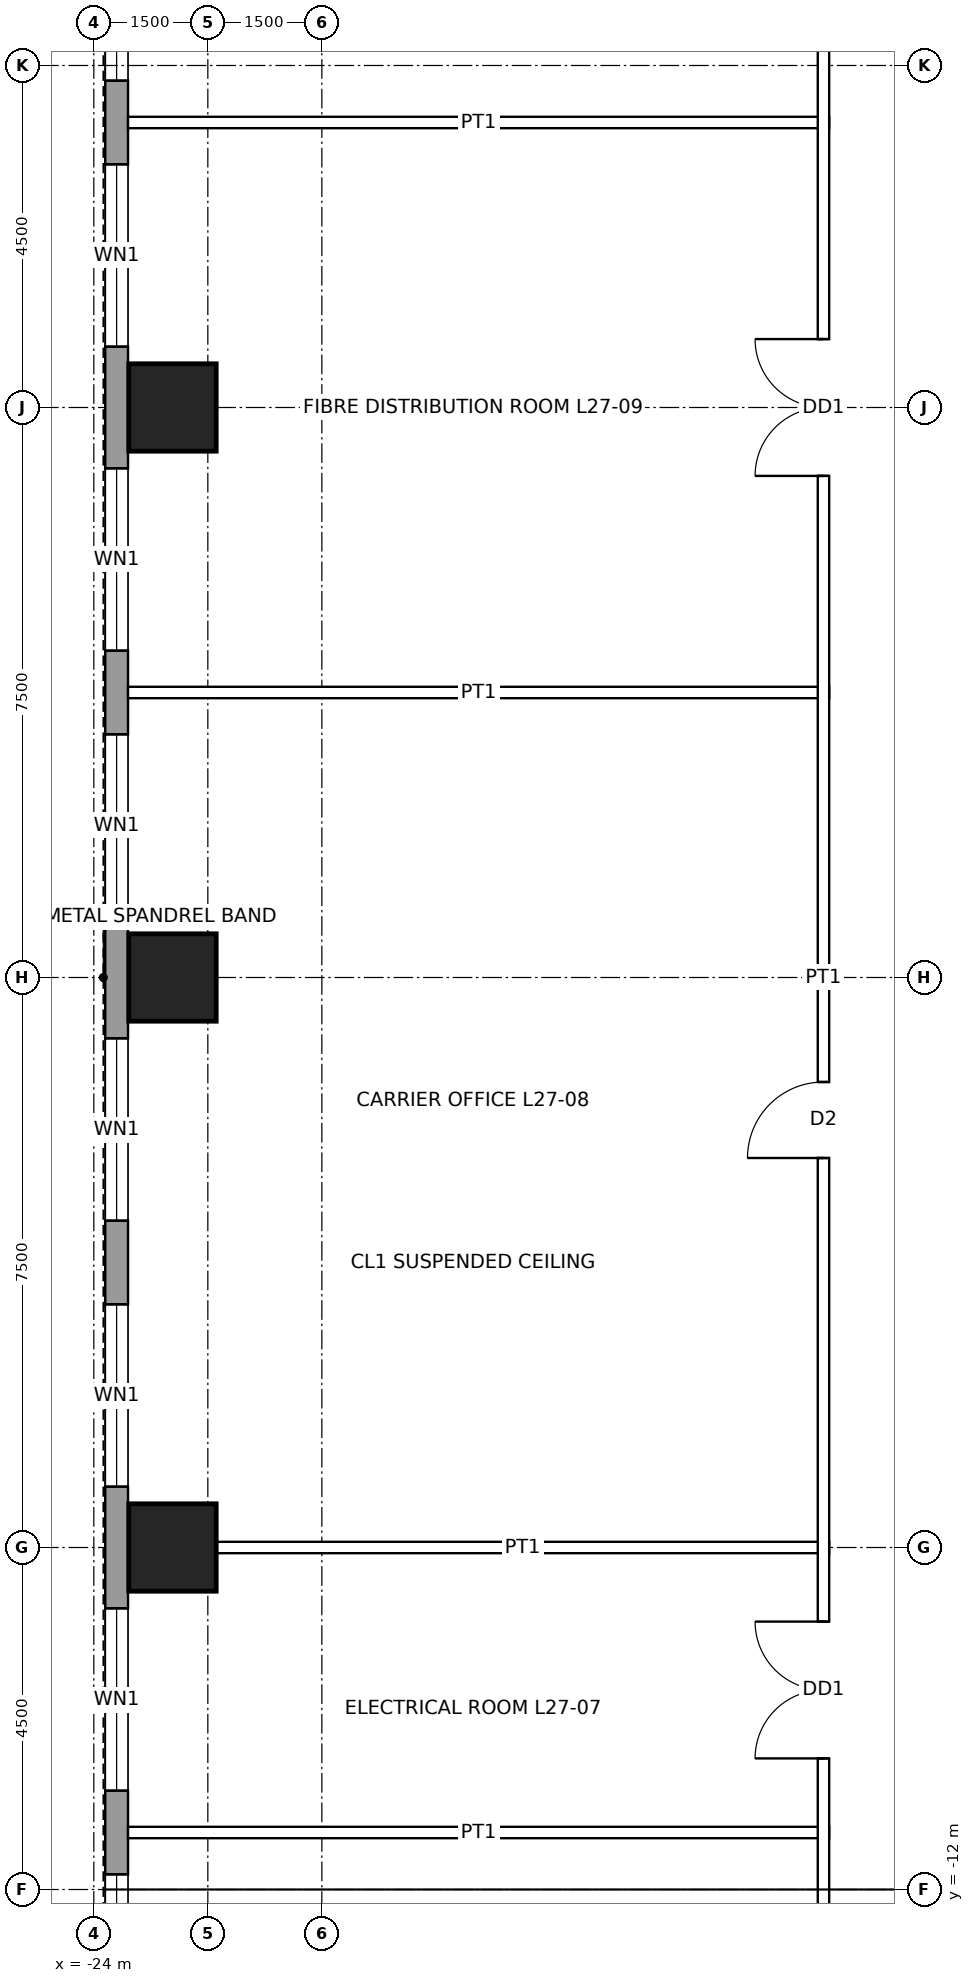
"""IFC4 building model, lengths in metres.
Left out: names, types, materials, properties, quantities, classifications, styles, units other than length and angle.
Written with IfcOpenShell. Run it as: python <this file> out.ifc"""

import sys

from ifc_helpers import new_model, si_unit, direction, frame, frame_2d, origin, origin_2d, place, context, subcontext, project, spatial, rectangle, hollow_rectangle, extrude, element, fill, save


model = new_model("IFC4")
c1 = context("Model", 3, precision=1e-05, world=origin(), true_north=direction((0.0, 1.0)))
c2 = subcontext(c1, "Body", "Model", "MODEL_VIEW")
j1 = project(units=[si_unit("LENGTHUNIT", "METRE"), si_unit("PLANEANGLEUNIT", "RADIAN")], contexts=[c1])
p1 = place(None, origin())
s1 = spatial("IfcSite", under=j1, at=p1, CompositionType="ELEMENT")
p2 = place(p1, origin())
s2 = spatial("IfcBuilding", under=s1, at=p2, CompositionType="ELEMENT")
p3 = place(p2, frame((0.0, 0.0, 135.9)))
s3 = spatial("IfcBuildingStorey", under=s2, at=p3, CompositionType="ELEMENT", Elevation=135.9)
for number, where, z_axis, x_axis in (
    (1, (-22.965, -7.5, 0.0), (0.0, 0.0, 1.0), (1.0, 0.0, 0.0)),
    (2, (-22.965, 0.0, 0.0), (0.0, 0.0, 1.0), (1.0, 0.0, 0.0)),
    (3, (-22.965, 7.5, 0.0), (0.0, 0.0, 1.0), (1.0, 0.0, 0.0)),
):
    element("IfcColumn", number, at=place(p3, frame(where, z_axis=z_axis, x_axis=x_axis)), inside=s3, PredefinedType="COLUMN", context=c2, shape_type="SweptSolid", body=[
        extrude(hollow_rectangle(XDim=1.15, YDim=1.15, WallThickness=0.075, at=origin_2d()), origin(), (0.0, 0.0, 1.0), 4.5),
    ])
p4 = place(p3, frame((-23.7, -16.2, 0.0), z_axis=(0.0, 0.0, 1.0), x_axis=(0.0, 1.0, 0.0)))
e4 = element("IfcWall", 4, at=p4, inside=s3, PredefinedType="SOLIDWALL", context=c2, shape_type="SweptSolid", body=[
    extrude(rectangle(XDim=32.4, YDim=0.3, at=frame_2d((16.2, 0.0))), origin(), (0.0, 0.0, 1.0), 4.3),
])
p5 = place(p4, frame((2.0, 0.0, 1.0)))
e5 = element("IfcOpeningElement", 5, at=p5, cuts=e4, PredefinedType="OPENING", context=c2, shape_type="SweptSolid", body=[
    extrude(rectangle(XDim=2.4, YDim=1.2, at=frame_2d((1.2, 0.6))), frame((0.0, 0.16, 0.0), z_axis=(0.0, -1.0, 0.0), x_axis=(1.0, 0.0, 0.0)), (0.0, 0.0, 1.0), 0.32),
])
p6 = place(p4, frame((5.5, 0.0, 1.0)))
e6 = element("IfcOpeningElement", 6, at=p6, cuts=e4, PredefinedType="OPENING", context=c2, shape_type="SweptSolid", body=[
    extrude(rectangle(XDim=2.4, YDim=1.2, at=frame_2d((1.2, 0.6))), frame((0.0, 0.16, 0.0), z_axis=(0.0, -1.0, 0.0), x_axis=(1.0, 0.0, 0.0)), (0.0, 0.0, 1.0), 0.32),
])
p7 = place(p4, frame((9.5, 0.0, 1.0)))
e7 = element("IfcOpeningElement", 7, at=p7, cuts=e4, PredefinedType="OPENING", context=c2, shape_type="SweptSolid", body=[
    extrude(rectangle(XDim=2.4, YDim=1.2, at=frame_2d((1.2, 0.6))), frame((0.0, 0.16, 0.0), z_axis=(0.0, -1.0, 0.0), x_axis=(1.0, 0.0, 0.0)), (0.0, 0.0, 1.0), 0.32),
])
p8 = place(p4, frame((13.0, 0.0, 1.0)))
e8 = element("IfcOpeningElement", 8, at=p8, cuts=e4, PredefinedType="OPENING", context=c2, shape_type="SweptSolid", body=[
    extrude(rectangle(XDim=2.4, YDim=1.2, at=frame_2d((1.2, 0.6))), frame((0.0, 0.16, 0.0), z_axis=(0.0, -1.0, 0.0), x_axis=(1.0, 0.0, 0.0)), (0.0, 0.0, 1.0), 0.32),
])
p9 = place(p4, frame((17.0, 0.0, 1.0)))
e9 = element("IfcOpeningElement", 9, at=p9, cuts=e4, PredefinedType="OPENING", context=c2, shape_type="SweptSolid", body=[
    extrude(rectangle(XDim=2.4, YDim=1.2, at=frame_2d((1.2, 0.6))), frame((0.0, 0.16, 0.0), z_axis=(0.0, -1.0, 0.0), x_axis=(1.0, 0.0, 0.0)), (0.0, 0.0, 1.0), 0.32),
])
p10 = place(p4, frame((20.5, 0.0, 1.0)))
e10 = element("IfcOpeningElement", 10, at=p10, cuts=e4, PredefinedType="OPENING", context=c2, shape_type="SweptSolid", body=[
    extrude(rectangle(XDim=2.4, YDim=1.2, at=frame_2d((1.2, 0.6))), frame((0.0, 0.16, 0.0), z_axis=(0.0, -1.0, 0.0), x_axis=(1.0, 0.0, 0.0)), (0.0, 0.0, 1.0), 0.32),
])
p11 = place(p4, frame((24.5, 0.0, 1.0)))
e11 = element("IfcOpeningElement", 11, at=p11, cuts=e4, PredefinedType="OPENING", context=c2, shape_type="SweptSolid", body=[
    extrude(rectangle(XDim=2.4, YDim=1.2, at=frame_2d((1.2, 0.6))), frame((0.0, 0.16, 0.0), z_axis=(0.0, -1.0, 0.0), x_axis=(1.0, 0.0, 0.0)), (0.0, 0.0, 1.0), 0.32),
])
p12 = place(p4, frame((28.0, 0.0, 1.0)))
e12 = element("IfcOpeningElement", 12, at=p12, cuts=e4, PredefinedType="OPENING", context=c2, shape_type="SweptSolid", body=[
    extrude(rectangle(XDim=2.4, YDim=1.2, at=frame_2d((1.2, 0.6))), frame((0.0, 0.16, 0.0), z_axis=(0.0, -1.0, 0.0), x_axis=(1.0, 0.0, 0.0)), (0.0, 0.0, 1.0), 0.32),
])
p13 = place(p3, frame((-23.55, -11.25, 0.0), z_axis=(0.0, 0.0, 1.0), x_axis=(1.0, 0.0, 0.0)))
e13 = element("IfcWall", 13, at=p13, inside=s3, PredefinedType="PARTITIONING", context=c2, shape_type="SweptSolid", body=[
    extrude(rectangle(XDim=9.225, YDim=0.15, at=frame_2d((4.613, 0.0))), origin(), (0.0, 0.0, 1.0), 3.431),
])
p14 = place(p3, frame((-22.39, -7.5, 0.0), z_axis=(0.0, 0.0, 1.0), x_axis=(1.0, 0.0, 0.0)))
e14 = element("IfcWall", 14, at=p14, inside=s3, PredefinedType="PARTITIONING", context=c2, shape_type="SweptSolid", body=[
    extrude(rectangle(XDim=8.065, YDim=0.15, at=frame_2d((4.032, 0.0))), origin(), (0.0, 0.0, 1.0), 3.431),
])
for number, where, z_axis, x_axis in (
    (15, (-23.55, 3.75, 0.0), (0.0, 0.0, 1.0), (1.0, 0.0, 0.0)),
    (16, (-23.55, 11.25, 0.0), (0.0, 0.0, 1.0), (1.0, 0.0, 0.0)),
):
    element("IfcWall", number, at=place(p3, frame(where, z_axis=z_axis, x_axis=x_axis)), inside=s3, PredefinedType="PARTITIONING", context=c2, shape_type="SweptSolid", body=[
        extrude(rectangle(XDim=9.225, YDim=0.15, at=frame_2d((4.613, 0.0))), origin(), (0.0, 0.0, 1.0), 3.431),
    ])
p15 = place(p3, frame((-14.4, -14.475, 0.0), z_axis=(0.0, 0.0, 1.0), x_axis=(0.0, 1.0, 0.0)))
e17 = element("IfcWall", 17, at=p15, inside=s3, PredefinedType="PARTITIONING", context=c2, shape_type="SweptSolid", body=[
    extrude(rectangle(XDim=28.95, YDim=0.15, at=frame_2d((14.475, 0.0))), origin(), (0.0, 0.0, 1.0), 4.3),
])
p16 = place(p15, frame((4.2, 0.0, 0.0)))
e18 = element("IfcOpeningElement", 18, at=p16, cuts=e17, PredefinedType="OPENING", context=c2, shape_type="SweptSolid", body=[
    extrude(rectangle(XDim=1.8, YDim=2.4, at=frame_2d((0.9, 1.2))), frame((0.0, 0.085, 0.0), z_axis=(0.0, -1.0, 0.0), x_axis=(1.0, 0.0, 0.0)), (0.0, 0.0, 1.0), 0.17),
])
p17 = place(p15, frame((12.1, 0.0, 0.0)))
e19 = element("IfcOpeningElement", 19, at=p17, cuts=e17, PredefinedType="OPENING", context=c2, shape_type="SweptSolid", body=[
    extrude(rectangle(XDim=1.0, YDim=2.1, at=frame_2d((0.5, 1.05))), frame((0.0, 0.085, 0.0), z_axis=(0.0, -1.0, 0.0), x_axis=(1.0, 0.0, 0.0)), (0.0, 0.0, 1.0), 0.17),
])
p18 = place(p15, frame((21.075, 0.0, 0.0)))
e20 = element("IfcOpeningElement", 20, at=p18, cuts=e17, PredefinedType="OPENING", context=c2, shape_type="SweptSolid", body=[
    extrude(rectangle(XDim=1.8, YDim=2.4, at=frame_2d((0.9, 1.2))), frame((0.0, 0.085, 0.0), z_axis=(0.0, -1.0, 0.0), x_axis=(1.0, 0.0, 0.0)), (0.0, 0.0, 1.0), 0.17),
])
p19 = place(p5, origin())
e21 = element("IfcWindow", 21, at=p19, inside=s3, PartitioningType="SINGLE_PANEL", PredefinedType="WINDOW", context=c2, shape_type="SweptSolid", body=[
    extrude(rectangle(XDim=2.4, YDim=1.2, at=frame_2d((1.2, 0.6))), frame((0.0, 0.03, 0.0), z_axis=(0.0, -1.0, 0.0), x_axis=(1.0, 0.0, 0.0)), (0.0, 0.0, 1.0), 0.06),
])
fill(e5, e21)
p20 = place(p6, origin())
e22 = element("IfcWindow", 22, at=p20, inside=s3, PartitioningType="SINGLE_PANEL", PredefinedType="WINDOW", context=c2, shape_type="SweptSolid", body=[
    extrude(rectangle(XDim=2.4, YDim=1.2, at=frame_2d((1.2, 0.6))), frame((0.0, 0.03, 0.0), z_axis=(0.0, -1.0, 0.0), x_axis=(1.0, 0.0, 0.0)), (0.0, 0.0, 1.0), 0.06),
])
fill(e6, e22)
p21 = place(p7, origin())
e23 = element("IfcWindow", 23, at=p21, inside=s3, PartitioningType="SINGLE_PANEL", PredefinedType="WINDOW", context=c2, shape_type="SweptSolid", body=[
    extrude(rectangle(XDim=2.4, YDim=1.2, at=frame_2d((1.2, 0.6))), frame((0.0, 0.03, 0.0), z_axis=(0.0, -1.0, 0.0), x_axis=(1.0, 0.0, 0.0)), (0.0, 0.0, 1.0), 0.06),
])
fill(e7, e23)
p22 = place(p8, origin())
e24 = element("IfcWindow", 24, at=p22, inside=s3, PartitioningType="SINGLE_PANEL", PredefinedType="WINDOW", context=c2, shape_type="SweptSolid", body=[
    extrude(rectangle(XDim=2.4, YDim=1.2, at=frame_2d((1.2, 0.6))), frame((0.0, 0.03, 0.0), z_axis=(0.0, -1.0, 0.0), x_axis=(1.0, 0.0, 0.0)), (0.0, 0.0, 1.0), 0.06),
])
fill(e8, e24)
p23 = place(p9, origin())
e25 = element("IfcWindow", 25, at=p23, inside=s3, PartitioningType="SINGLE_PANEL", PredefinedType="WINDOW", context=c2, shape_type="SweptSolid", body=[
    extrude(rectangle(XDim=2.4, YDim=1.2, at=frame_2d((1.2, 0.6))), frame((0.0, 0.03, 0.0), z_axis=(0.0, -1.0, 0.0), x_axis=(1.0, 0.0, 0.0)), (0.0, 0.0, 1.0), 0.06),
])
fill(e9, e25)
p24 = place(p10, origin())
e26 = element("IfcWindow", 26, at=p24, inside=s3, PartitioningType="SINGLE_PANEL", PredefinedType="WINDOW", context=c2, shape_type="SweptSolid", body=[
    extrude(rectangle(XDim=2.4, YDim=1.2, at=frame_2d((1.2, 0.6))), frame((0.0, 0.03, 0.0), z_axis=(0.0, -1.0, 0.0), x_axis=(1.0, 0.0, 0.0)), (0.0, 0.0, 1.0), 0.06),
])
fill(e10, e26)
p25 = place(p11, origin())
e27 = element("IfcWindow", 27, at=p25, inside=s3, PartitioningType="SINGLE_PANEL", PredefinedType="WINDOW", context=c2, shape_type="SweptSolid", body=[
    extrude(rectangle(XDim=2.4, YDim=1.2, at=frame_2d((1.2, 0.6))), frame((0.0, 0.03, 0.0), z_axis=(0.0, -1.0, 0.0), x_axis=(1.0, 0.0, 0.0)), (0.0, 0.0, 1.0), 0.06),
])
fill(e11, e27)
p26 = place(p12, origin())
e28 = element("IfcWindow", 28, at=p26, inside=s3, PartitioningType="SINGLE_PANEL", PredefinedType="WINDOW", context=c2, shape_type="SweptSolid", body=[
    extrude(rectangle(XDim=2.4, YDim=1.2, at=frame_2d((1.2, 0.6))), frame((0.0, 0.03, 0.0), z_axis=(0.0, -1.0, 0.0), x_axis=(1.0, 0.0, 0.0)), (0.0, 0.0, 1.0), 0.06),
])
fill(e12, e28)
p27 = place(p16, origin())
e29 = element("IfcDoor", 29, at=p27, inside=s3, OperationType="DOUBLE_DOOR_SINGLE_SWING", PredefinedType="DOOR", context=c2, shape_type="SweptSolid", body=[
    extrude(rectangle(XDim=1.8, YDim=2.4, at=frame_2d((0.9, 1.2))), frame((0.0, 0.025, 0.0), z_axis=(0.0, -1.0, 0.0), x_axis=(1.0, 0.0, 0.0)), (0.0, 0.0, 1.0), 0.05),
])
fill(e18, e29)
p28 = place(p17, origin())
e30 = element("IfcDoor", 30, at=p28, inside=s3, OperationType="SINGLE_SWING_LEFT", PredefinedType="DOOR", context=c2, shape_type="SweptSolid", body=[
    extrude(rectangle(XDim=1.0, YDim=2.1, at=frame_2d((0.5, 1.05))), frame((0.0, 0.025, 0.0), z_axis=(0.0, -1.0, 0.0), x_axis=(1.0, 0.0, 0.0)), (0.0, 0.0, 1.0), 0.05),
])
fill(e19, e30)
p29 = place(p18, origin())
e31 = element("IfcDoor", 31, at=p29, inside=s3, OperationType="DOUBLE_DOOR_SINGLE_SWING", PredefinedType="DOOR", context=c2, shape_type="SweptSolid", body=[
    extrude(rectangle(XDim=1.8, YDim=2.4, at=frame_2d((0.9, 1.2))), frame((0.0, 0.025, 0.0), z_axis=(0.0, -1.0, 0.0), x_axis=(1.0, 0.0, 0.0)), (0.0, 0.0, 1.0), 0.05),
])
fill(e20, e31)
save(model, sys.argv[1])
